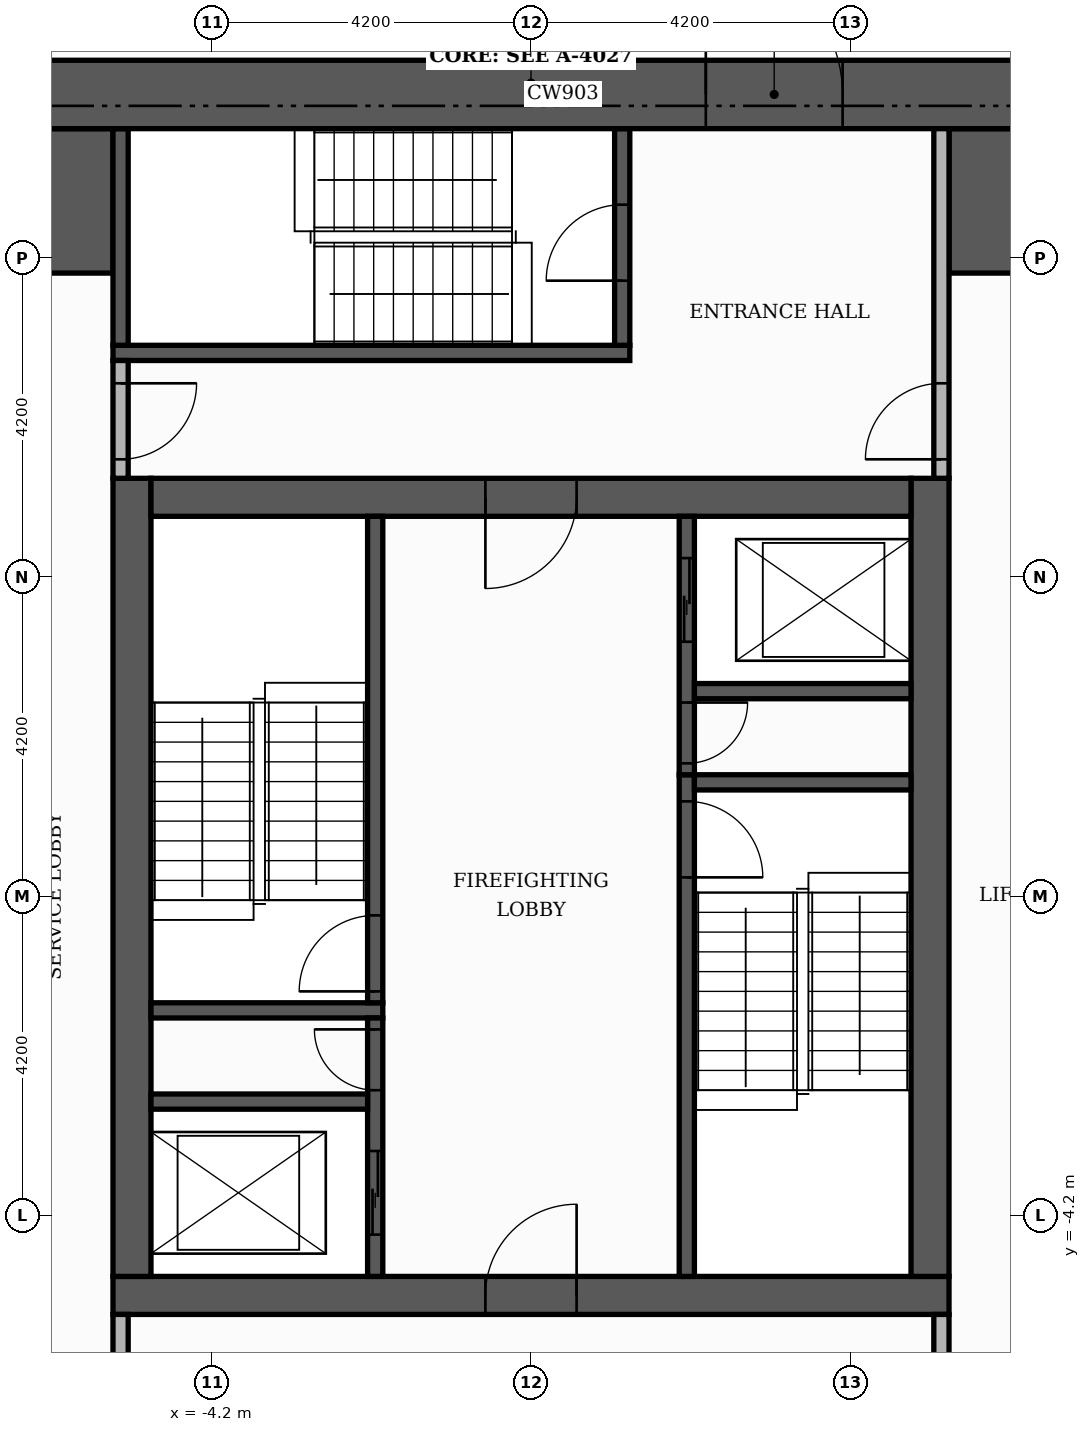
"""IFC4 building model, lengths in metres.
Left out: names, types, materials, properties, quantities, classifications, styles, units other than length and angle.
Written with IfcOpenShell. Run it as: python <this file> out.ifc"""

import sys

from ifc_helpers import new_model, si_unit, direction, frame, frame_2d, origin, place, context, subcontext, project, spatial, rectangle, extrude, element, fill, save


model = new_model("IFC4")
c1 = context("Model", 3, precision=1e-05, world=origin(), true_north=direction((0.0, 1.0)))
c2 = subcontext(c1, "Body", "Model", "MODEL_VIEW")
j1 = project(units=[si_unit("LENGTHUNIT", "METRE"), si_unit("PLANEANGLEUNIT", "RADIAN")], contexts=[c1])
p1 = place(None, origin())
s1 = spatial("IfcSite", under=j1, at=p1, CompositionType="ELEMENT")
p2 = place(p1, origin())
s2 = spatial("IfcBuilding", under=s1, at=p2, CompositionType="ELEMENT")
p3 = place(p2, frame((0.0, 0.0, 165.0)))
s3 = spatial("IfcBuildingStorey", under=s2, at=p3, CompositionType="ELEMENT", Elevation=165.0)
p4 = place(p3, frame((-5.5, -5.25, 0.0), z_axis=(0.0, 0.0, 1.0), x_axis=(1.0, 0.0, 0.0)))
e1 = element("IfcWall", 1, at=p4, inside=s3, PredefinedType="SHEAR", context=c2, shape_type="SweptSolid", body=[
    extrude(rectangle(XDim=11.0, YDim=0.5, at=frame_2d((5.5, 0.0))), origin(), (0.0, 0.0, 1.0), 3.48),
])
p5 = place(p4, frame((4.9, 0.0, 0.0)))
e2 = element("IfcOpeningElement", 2, at=p5, cuts=e1, PredefinedType="OPENING", context=c2, shape_type="SweptSolid", body=[
    extrude(rectangle(XDim=1.2, YDim=2.1, at=frame_2d((0.6, 1.05))), frame((0.0, 0.26, 0.0), z_axis=(0.0, -1.0, 0.0), x_axis=(1.0, 0.0, 0.0)), (0.0, 0.0, 1.0), 0.52),
])
for number, where, z_axis, x_axis in (
    (3, (-5.25, -5.0, 0.0), (0.0, 0.0, 1.0), (0.0, 1.0, 0.0)),
    (4, (5.25, -5.0, 0.0), (0.0, 0.0, 1.0), (0.0, 1.0, 0.0)),
):
    element("IfcWall", number, at=place(p3, frame(where, z_axis=z_axis, x_axis=x_axis)), inside=s3, PredefinedType="SHEAR", context=c2, shape_type="SweptSolid", body=[
        extrude(rectangle(XDim=10.5, YDim=0.5, at=frame_2d((5.25, 0.0))), origin(), (0.0, 0.0, 1.0), 3.48),
    ])
p6 = place(p3, frame((-5.0, 5.25, 0.0), z_axis=(0.0, 0.0, 1.0), x_axis=(1.0, 0.0, 0.0)))
e5 = element("IfcWall", 5, at=p6, inside=s3, PredefinedType="SHEAR", context=c2, shape_type="SweptSolid", body=[
    extrude(rectangle(XDim=10.0, YDim=0.5, at=frame_2d((5.0, 0.0))), origin(), (0.0, 0.0, 1.0), 3.48),
])
p7 = place(p6, frame((4.4, 0.0, 0.0)))
e6 = element("IfcOpeningElement", 6, at=p7, cuts=e5, PredefinedType="OPENING", context=c2, shape_type="SweptSolid", body=[
    extrude(rectangle(XDim=1.2, YDim=2.1, at=frame_2d((0.6, 1.05))), frame((0.0, 0.26, 0.0), z_axis=(0.0, -1.0, 0.0), x_axis=(1.0, 0.0, 0.0)), (0.0, 0.0, 1.0), 0.52),
])
for number, where, z_axis, x_axis in (
    (7, (-10.1, 9.15, 0.0), (0.0, 0.0, 1.0), (1.0, 0.0, 0.0)),
    (8, (5.5, 9.15, 0.0), (0.0, 0.0, 1.0), (1.0, 0.0, 0.0)),
):
    element("IfcWall", number, at=place(p3, frame(where, z_axis=z_axis, x_axis=x_axis)), inside=s3, PredefinedType="SHEAR", context=c2, shape_type="SweptSolid", body=[
        extrude(rectangle(XDim=4.6, YDim=1.9, at=frame_2d((2.3, 0.0))), origin(), (0.0, 0.0, 1.0), 3.48),
    ])
p8 = place(p3, frame((2.05, -5.0, 0.0), z_axis=(0.0, 0.0, 1.0), x_axis=(0.0, 1.0, 0.0)))
e9 = element("IfcWall", 9, at=p8, inside=s3, PredefinedType="SHEAR", context=c2, shape_type="SweptSolid", body=[
    extrude(rectangle(XDim=6.6, YDim=0.2, at=frame_2d((3.3, 0.0))), origin(), (0.0, 0.0, 1.0), 3.48),
])
p9 = place(p8, frame((5.25, 0.0, 0.0)))
e10 = element("IfcOpeningElement", 10, at=p9, cuts=e9, PredefinedType="OPENING", context=c2, shape_type="SweptSolid", body=[
    extrude(rectangle(XDim=1.0, YDim=2.1, at=frame_2d((0.5, 1.05))), frame((0.0, 0.11, 0.0), z_axis=(0.0, -1.0, 0.0), x_axis=(1.0, 0.0, 0.0)), (0.0, 0.0, 1.0), 0.22),
])
p10 = place(p3, frame((-5.0, -1.5, 0.0), z_axis=(0.0, 0.0, 1.0), x_axis=(1.0, 0.0, 0.0)))
e11 = element("IfcWall", 11, at=p10, inside=s3, PredefinedType="SHEAR", context=c2, shape_type="SweptSolid", body=[
    extrude(rectangle(XDim=3.05, YDim=0.2, at=frame_2d((1.525, 0.0))), origin(), (0.0, 0.0, 1.0), 3.48),
])
p11 = place(p3, frame((-2.05, -1.4, 0.0), z_axis=(0.0, 0.0, 1.0), x_axis=(0.0, 1.0, 0.0)))
e12 = element("IfcWall", 12, at=p11, inside=s3, PredefinedType="SHEAR", context=c2, shape_type="SweptSolid", body=[
    extrude(rectangle(XDim=6.4, YDim=0.2, at=frame_2d((3.2, 0.0))), origin(), (0.0, 0.0, 1.0), 3.48),
])
p12 = place(p11, frame((0.15, 0.0, 0.0)))
e13 = element("IfcOpeningElement", 13, at=p12, cuts=e12, PredefinedType="OPENING", context=c2, shape_type="SweptSolid", body=[
    extrude(rectangle(XDim=1.0, YDim=2.1, at=frame_2d((0.5, 1.05))), frame((0.0, 0.11, 0.0), z_axis=(0.0, -1.0, 0.0), x_axis=(1.0, 0.0, 0.0)), (0.0, 0.0, 1.0), 0.22),
])
p13 = place(p3, frame((2.15, 1.5, 0.0), z_axis=(0.0, 0.0, 1.0), x_axis=(1.0, 0.0, 0.0)))
e14 = element("IfcWall", 14, at=p13, inside=s3, PredefinedType="SHEAR", context=c2, shape_type="SweptSolid", body=[
    extrude(rectangle(XDim=2.85, YDim=0.2, at=frame_2d((1.425, 0.0))), origin(), (0.0, 0.0, 1.0), 3.48),
])
p14 = place(p3, frame((-5.5, 7.15, 0.0), z_axis=(0.0, 0.0, 1.0), x_axis=(1.0, 0.0, 0.0)))
e15 = element("IfcWall", 15, at=p14, inside=s3, PredefinedType="SHEAR", context=c2, shape_type="SweptSolid", body=[
    extrude(rectangle(XDim=6.8, YDim=0.2, at=frame_2d((3.4, 0.0))), origin(), (0.0, 0.0, 1.0), 3.48),
])
p15 = place(p3, frame((-5.4, 7.25, 0.0), z_axis=(0.0, 0.0, 1.0), x_axis=(0.0, 1.0, 0.0)))
e16 = element("IfcWall", 16, at=p15, inside=s3, PredefinedType="SHEAR", context=c2, shape_type="SweptSolid", body=[
    extrude(rectangle(XDim=2.85, YDim=0.2, at=frame_2d((1.425, 0.0))), origin(), (0.0, 0.0, 1.0), 3.48),
])
p16 = place(p3, frame((1.2, 7.25, 0.0), z_axis=(0.0, 0.0, 1.0), x_axis=(0.0, 1.0, 0.0)))
e17 = element("IfcWall", 17, at=p16, inside=s3, PredefinedType="SHEAR", context=c2, shape_type="SweptSolid", body=[
    extrude(rectangle(XDim=2.85, YDim=0.2, at=frame_2d((1.425, 0.0))), origin(), (0.0, 0.0, 1.0), 3.48),
])
p17 = place(p16, frame((0.85, 0.0, 0.0)))
e18 = element("IfcOpeningElement", 18, at=p17, cuts=e17, PredefinedType="OPENING", context=c2, shape_type="SweptSolid", body=[
    extrude(rectangle(XDim=1.0, YDim=2.1, at=frame_2d((0.5, 1.05))), frame((0.0, 0.11, 0.0), z_axis=(0.0, -1.0, 0.0), x_axis=(1.0, 0.0, 0.0)), (0.0, 0.0, 1.0), 0.22),
])
p18 = place(p3, frame((-2.05, -5.0, 0.0), z_axis=(0.0, 0.0, 1.0), x_axis=(0.0, 1.0, 0.0)))
e19 = element("IfcWall", 19, at=p18, inside=s3, PredefinedType="SHEAR", context=c2, shape_type="SweptSolid", body=[
    extrude(rectangle(XDim=3.4, YDim=0.2, at=frame_2d((1.7, 0.0))), origin(), (0.0, 0.0, 1.0), 3.48),
])
p19 = place(p18, frame((0.55, 0.0, 0.0)))
e20 = element("IfcOpeningElement", 20, at=p19, cuts=e19, PredefinedType="OPENING", context=c2, shape_type="SweptSolid", body=[
    extrude(rectangle(XDim=1.1, YDim=2.1, at=frame_2d((0.55, 1.05))), frame((0.0, 0.11, 0.0), z_axis=(0.0, -1.0, 0.0), x_axis=(1.0, 0.0, 0.0)), (0.0, 0.0, 1.0), 0.22),
])
p20 = place(p18, frame((2.45, 0.0, 0.0)))
e21 = element("IfcOpeningElement", 21, at=p20, cuts=e19, PredefinedType="OPENING", context=c2, shape_type="SweptSolid", body=[
    extrude(rectangle(XDim=0.8, YDim=2.1, at=frame_2d((0.4, 1.05))), frame((0.0, 0.11, 0.0), z_axis=(0.0, -1.0, 0.0), x_axis=(1.0, 0.0, 0.0)), (0.0, 0.0, 1.0), 0.22),
])
p21 = place(p3, frame((-5.0, -2.7, 0.0), z_axis=(0.0, 0.0, 1.0), x_axis=(1.0, 0.0, 0.0)))
e22 = element("IfcWall", 22, at=p21, inside=s3, PredefinedType="SHEAR", context=c2, shape_type="SweptSolid", body=[
    extrude(rectangle(XDim=2.85, YDim=0.2, at=frame_2d((1.425, 0.0))), origin(), (0.0, 0.0, 1.0), 3.48),
])
p22 = place(p3, frame((2.05, 1.6, 0.0), z_axis=(0.0, 0.0, 1.0), x_axis=(0.0, 1.0, 0.0)))
e23 = element("IfcWall", 23, at=p22, inside=s3, PredefinedType="SHEAR", context=c2, shape_type="SweptSolid", body=[
    extrude(rectangle(XDim=3.4, YDim=0.2, at=frame_2d((1.7, 0.0))), origin(), (0.0, 0.0, 1.0), 3.48),
])
p23 = place(p22, frame((1.75, 0.0, 0.0)))
e24 = element("IfcOpeningElement", 24, at=p23, cuts=e23, PredefinedType="OPENING", context=c2, shape_type="SweptSolid", body=[
    extrude(rectangle(XDim=1.1, YDim=2.1, at=frame_2d((0.55, 1.05))), frame((0.0, 0.11, 0.0), z_axis=(0.0, -1.0, 0.0), x_axis=(1.0, 0.0, 0.0)), (0.0, 0.0, 1.0), 0.22),
])
p24 = place(p22, frame((0.15, 0.0, 0.0)))
e25 = element("IfcOpeningElement", 25, at=p24, cuts=e23, PredefinedType="OPENING", context=c2, shape_type="SweptSolid", body=[
    extrude(rectangle(XDim=0.8, YDim=2.1, at=frame_2d((0.4, 1.05))), frame((0.0, 0.11, 0.0), z_axis=(0.0, -1.0, 0.0), x_axis=(1.0, 0.0, 0.0)), (0.0, 0.0, 1.0), 0.22),
])
p25 = place(p3, frame((2.15, 2.7, 0.0), z_axis=(0.0, 0.0, 1.0), x_axis=(1.0, 0.0, 0.0)))
e26 = element("IfcWall", 26, at=p25, inside=s3, PredefinedType="SHEAR", context=c2, shape_type="SweptSolid", body=[
    extrude(rectangle(XDim=2.85, YDim=0.2, at=frame_2d((1.425, 0.0))), origin(), (0.0, 0.0, 1.0), 3.48),
])
p26 = place(p3, frame((-11.0, 10.55, 0.0), z_axis=(0.0, 0.0, 1.0), x_axis=(1.0, 0.0, 0.0)))
e27 = element("IfcWall", 27, at=p26, inside=s3, PredefinedType="SHEAR", context=c2, shape_type="SweptSolid", body=[
    extrude(rectangle(XDim=22.0, YDim=0.9, at=frame_2d((11.0, 0.0))), origin(), (0.0, 0.0, 1.0), 3.48),
])
p27 = place(p26, frame((13.3, 0.0, 0.0)))
e28 = element("IfcOpeningElement", 28, at=p27, cuts=e27, PredefinedType="OPENING", context=c2, shape_type="SweptSolid", body=[
    extrude(rectangle(XDim=1.8, YDim=2.2, at=frame_2d((0.9, 1.1))), frame((0.0, 0.46, 0.0), z_axis=(0.0, -1.0, 0.0), x_axis=(1.0, 0.0, 0.0)), (0.0, 0.0, 1.0), 0.92),
])
p28 = place(p3, frame((-5.4, -10.1, 0.0), z_axis=(0.0, 0.0, 1.0), x_axis=(0.0, 1.0, 0.0)))
e29 = element("IfcWall", 29, at=p28, inside=s3, PredefinedType="PARTITIONING", context=c2, shape_type="SweptSolid", body=[
    extrude(rectangle(XDim=4.6, YDim=0.2, at=frame_2d((2.3, 0.0))), origin(), (0.0, 0.0, 1.0), 3.48),
])
p29 = place(p28, frame((2.9, 0.0, 0.0)))
e30 = element("IfcOpeningElement", 30, at=p29, cuts=e29, PredefinedType="OPENING", context=c2, shape_type="SweptSolid", body=[
    extrude(rectangle(XDim=1.0, YDim=2.1, at=frame_2d((0.5, 1.05))), frame((0.0, 0.11, 0.0), z_axis=(0.0, -1.0, 0.0), x_axis=(1.0, 0.0, 0.0)), (0.0, 0.0, 1.0), 0.22),
])
p30 = place(p3, frame((5.4, -10.1, 0.0), z_axis=(0.0, 0.0, 1.0), x_axis=(0.0, 1.0, 0.0)))
e31 = element("IfcWall", 31, at=p30, inside=s3, PredefinedType="PARTITIONING", context=c2, shape_type="SweptSolid", body=[
    extrude(rectangle(XDim=4.6, YDim=0.2, at=frame_2d((2.3, 0.0))), origin(), (0.0, 0.0, 1.0), 3.48),
])
p31 = place(p30, frame((2.9, 0.0, 0.0)))
e32 = element("IfcOpeningElement", 32, at=p31, cuts=e31, PredefinedType="OPENING", context=c2, shape_type="SweptSolid", body=[
    extrude(rectangle(XDim=1.0, YDim=2.1, at=frame_2d((0.5, 1.05))), frame((0.0, 0.11, 0.0), z_axis=(0.0, -1.0, 0.0), x_axis=(1.0, 0.0, 0.0)), (0.0, 0.0, 1.0), 0.22),
])
p32 = place(p3, frame((-5.4, 5.5, 0.0), z_axis=(0.0, 0.0, 1.0), x_axis=(0.0, 1.0, 0.0)))
e33 = element("IfcWall", 33, at=p32, inside=s3, PredefinedType="PARTITIONING", context=c2, shape_type="SweptSolid", body=[
    extrude(rectangle(XDim=1.55, YDim=0.2, at=frame_2d((0.775, 0.0))), origin(), (0.0, 0.0, 1.0), 3.48),
])
p33 = place(p32, frame((0.25, 0.0, 0.0)))
e34 = element("IfcOpeningElement", 34, at=p33, cuts=e33, PredefinedType="OPENING", context=c2, shape_type="SweptSolid", body=[
    extrude(rectangle(XDim=1.0, YDim=2.1, at=frame_2d((0.5, 1.05))), frame((0.0, 0.11, 0.0), z_axis=(0.0, -1.0, 0.0), x_axis=(1.0, 0.0, 0.0)), (0.0, 0.0, 1.0), 0.22),
])
p34 = place(p3, frame((5.4, 5.5, 0.0), z_axis=(0.0, 0.0, 1.0), x_axis=(0.0, 1.0, 0.0)))
e35 = element("IfcWall", 35, at=p34, inside=s3, PredefinedType="PARTITIONING", context=c2, shape_type="SweptSolid", body=[
    extrude(rectangle(XDim=4.6, YDim=0.2, at=frame_2d((2.3, 0.0))), origin(), (0.0, 0.0, 1.0), 3.48),
])
p35 = place(p34, frame((0.25, 0.0, 0.0)))
e36 = element("IfcOpeningElement", 36, at=p35, cuts=e35, PredefinedType="OPENING", context=c2, shape_type="SweptSolid", body=[
    extrude(rectangle(XDim=1.0, YDim=2.1, at=frame_2d((0.5, 1.05))), frame((0.0, 0.11, 0.0), z_axis=(0.0, -1.0, 0.0), x_axis=(1.0, 0.0, 0.0)), (0.0, 0.0, 1.0), 0.22),
])
p36 = place(p23, origin())
e37 = element("IfcDoor", 37, at=p36, inside=s3, OperationType="SLIDING_TO_LEFT", PredefinedType="DOOR", context=c2, shape_type="SweptSolid", body=[
    extrude(rectangle(XDim=1.1, YDim=2.1, at=frame_2d((0.55, 1.05))), frame((0.0, 0.025, 0.0), z_axis=(0.0, -1.0, 0.0), x_axis=(1.0, 0.0, 0.0)), (0.0, 0.0, 1.0), 0.05),
])
fill(e24, e37)
p37 = place(p19, origin())
e38 = element("IfcDoor", 38, at=p37, inside=s3, OperationType="SLIDING_TO_LEFT", PredefinedType="DOOR", context=c2, shape_type="SweptSolid", body=[
    extrude(rectangle(XDim=1.1, YDim=2.1, at=frame_2d((0.55, 1.05))), frame((0.0, 0.025, 0.0), z_axis=(0.0, -1.0, 0.0), x_axis=(1.0, 0.0, 0.0)), (0.0, 0.0, 1.0), 0.05),
])
fill(e20, e38)
p38 = place(p12, origin())
e39 = element("IfcDoor", 39, at=p38, inside=s3, OperationType="SINGLE_SWING_LEFT", PredefinedType="DOOR", context=c2, shape_type="SweptSolid", body=[
    extrude(rectangle(XDim=1.0, YDim=2.1, at=frame_2d((0.5, 1.05))), frame((0.0, 0.025, 0.0), z_axis=(0.0, -1.0, 0.0), x_axis=(1.0, 0.0, 0.0)), (0.0, 0.0, 1.0), 0.05),
])
fill(e13, e39)
p39 = place(p9, frame((1.0, 0.0, 0.0), z_axis=(0.0, 0.0, 1.0), x_axis=(-1.0, 0.0, 0.0)))
e40 = element("IfcDoor", 40, at=p39, inside=s3, OperationType="SINGLE_SWING_LEFT", PredefinedType="DOOR", context=c2, shape_type="SweptSolid", body=[
    extrude(rectangle(XDim=1.0, YDim=2.1, at=frame_2d((0.5, 1.05))), frame((0.0, 0.025, 0.0), z_axis=(0.0, -1.0, 0.0), x_axis=(1.0, 0.0, 0.0)), (0.0, 0.0, 1.0), 0.05),
])
fill(e10, e40)
p40 = place(p24, frame((0.8, 0.0, 0.0), z_axis=(0.0, 0.0, 1.0), x_axis=(-1.0, 0.0, 0.0)))
e41 = element("IfcDoor", 41, at=p40, inside=s3, OperationType="SINGLE_SWING_RIGHT", PredefinedType="DOOR", context=c2, shape_type="SweptSolid", body=[
    extrude(rectangle(XDim=0.8, YDim=2.1, at=frame_2d((0.4, 1.05))), frame((0.0, 0.025, 0.0), z_axis=(0.0, -1.0, 0.0), x_axis=(1.0, 0.0, 0.0)), (0.0, 0.0, 1.0), 0.05),
])
fill(e25, e41)
p41 = place(p20, origin())
e42 = element("IfcDoor", 42, at=p41, inside=s3, OperationType="SINGLE_SWING_RIGHT", PredefinedType="DOOR", context=c2, shape_type="SweptSolid", body=[
    extrude(rectangle(XDim=0.8, YDim=2.1, at=frame_2d((0.4, 1.05))), frame((0.0, 0.025, 0.0), z_axis=(0.0, -1.0, 0.0), x_axis=(1.0, 0.0, 0.0)), (0.0, 0.0, 1.0), 0.05),
])
fill(e21, e42)
p42 = place(p7, frame((1.2, 0.0, 0.0), z_axis=(0.0, 0.0, 1.0), x_axis=(-1.0, 0.0, 0.0)))
e43 = element("IfcDoor", 43, at=p42, inside=s3, OperationType="SINGLE_SWING_LEFT", PredefinedType="DOOR", context=c2, shape_type="SweptSolid", body=[
    extrude(rectangle(XDim=1.2, YDim=2.1, at=frame_2d((0.6, 1.05))), frame((0.0, 0.025, 0.0), z_axis=(0.0, -1.0, 0.0), x_axis=(1.0, 0.0, 0.0)), (0.0, 0.0, 1.0), 0.05),
])
fill(e6, e43)
p43 = place(p5, origin())
e44 = element("IfcDoor", 44, at=p43, inside=s3, OperationType="SINGLE_SWING_RIGHT", PredefinedType="DOOR", context=c2, shape_type="SweptSolid", body=[
    extrude(rectangle(XDim=1.2, YDim=2.1, at=frame_2d((0.6, 1.05))), frame((0.0, 0.025, 0.0), z_axis=(0.0, -1.0, 0.0), x_axis=(1.0, 0.0, 0.0)), (0.0, 0.0, 1.0), 0.05),
])
fill(e2, e44)
p44 = place(p17, origin())
e45 = element("IfcDoor", 45, at=p44, inside=s3, OperationType="SINGLE_SWING_LEFT", PredefinedType="DOOR", context=c2, shape_type="SweptSolid", body=[
    extrude(rectangle(XDim=1.0, YDim=2.1, at=frame_2d((0.5, 1.05))), frame((0.0, 0.025, 0.0), z_axis=(0.0, -1.0, 0.0), x_axis=(1.0, 0.0, 0.0)), (0.0, 0.0, 1.0), 0.05),
])
fill(e18, e45)
p45 = place(p33, frame((1.0, 0.0, 0.0), z_axis=(0.0, 0.0, 1.0), x_axis=(-1.0, 0.0, 0.0)))
e46 = element("IfcDoor", 46, at=p45, inside=s3, OperationType="SINGLE_SWING_RIGHT", PredefinedType="DOOR", context=c2, shape_type="SweptSolid", body=[
    extrude(rectangle(XDim=1.0, YDim=2.1, at=frame_2d((0.5, 1.05))), frame((0.0, 0.025, 0.0), z_axis=(0.0, -1.0, 0.0), x_axis=(1.0, 0.0, 0.0)), (0.0, 0.0, 1.0), 0.05),
])
fill(e34, e46)
p46 = place(p35, origin())
e47 = element("IfcDoor", 47, at=p46, inside=s3, OperationType="SINGLE_SWING_LEFT", PredefinedType="DOOR", context=c2, shape_type="SweptSolid", body=[
    extrude(rectangle(XDim=1.0, YDim=2.1, at=frame_2d((0.5, 1.05))), frame((0.0, 0.025, 0.0), z_axis=(0.0, -1.0, 0.0), x_axis=(1.0, 0.0, 0.0)), (0.0, 0.0, 1.0), 0.05),
])
fill(e36, e47)
p47 = place(p27, origin())
e48 = element("IfcDoor", 48, at=p47, inside=s3, OperationType="DOUBLE_DOOR_SINGLE_SWING", PredefinedType="DOOR", context=c2, shape_type="SweptSolid", body=[
    extrude(rectangle(XDim=1.8, YDim=2.2, at=frame_2d((0.9, 1.1))), frame((0.0, 0.025, 0.0), z_axis=(0.0, -1.0, 0.0), x_axis=(1.0, 0.0, 0.0)), (0.0, 0.0, 1.0), 0.05),
])
fill(e28, e48)
save(model, sys.argv[1])
